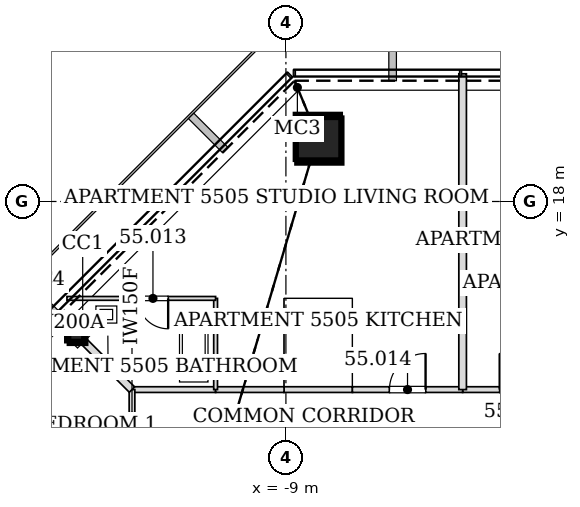
"""IFC4 building model, lengths in metres.
Left out: names, types, materials, properties, quantities, classifications, styles, units other than length and angle.
Written with IfcOpenShell. Run it as: python <this file> out.ifc"""

import sys

from ifc_helpers import new_model, si_unit, direction, frame, frame_2d, origin, origin_2d, place, context, subcontext, project, spatial, rectangle, hollow_rectangle, extrude, element, fill, save


model = new_model("IFC4")
c1 = context("Model", 3, precision=1e-05, world=origin(), true_north=direction((0.0, 1.0)))
c2 = subcontext(c1, "Body", "Model", "MODEL_VIEW")
j1 = project(units=[si_unit("LENGTHUNIT", "METRE"), si_unit("PLANEANGLEUNIT", "RADIAN")], contexts=[c1])
p1 = place(None, origin())
s1 = spatial("IfcSite", under=j1, at=p1, CompositionType="ELEMENT")
p2 = place(p1, origin())
s2 = spatial("IfcBuilding", under=s1, at=p2, CompositionType="ELEMENT")
p3 = place(p2, frame((0.0, 0.0, 234.6)))
s3 = spatial("IfcBuildingStorey", under=s2, at=p3, CompositionType="ELEMENT", Elevation=234.6)
p4 = place(p3, frame((-8.16, 19.7, 0.0), z_axis=(0.01169924247, -0.02827915051, 0.999531598986), x_axis=(0.924045401938, 0.382282742426, 0.0)))
e1 = element("IfcColumn", 1, at=p4, inside=s3, PredefinedType="COLUMN", context=c2, shape_type="SweptSolid", body=[
    extrude(hollow_rectangle(XDim=1.2, YDim=1.2, WallThickness=0.055, at=origin_2d()), origin(), (0.0, 0.0, 1.0), 3.402),
])
p5 = place(p3, frame((-14.551, 14.551, 0.0), z_axis=(0.020026431307, -0.020026431307, 0.999598861593), x_axis=(0.707106781187, 0.707106781187, 0.0)))
e2 = element("IfcColumn", 2, at=p5, inside=s3, PredefinedType="COLUMN", context=c2, shape_type="SweptSolid", body=[
    extrude(hollow_rectangle(XDim=0.45, YDim=0.45, WallThickness=0.02, at=origin_2d()), origin(), (0.0, 0.0, 1.0), 3.401),
])
p6 = place(p3, frame((-1.449, 13.05, 0.0), z_axis=(0.0, 0.0, 1.0), x_axis=(-1.0, 0.0, 0.0)))
e3 = element("IfcWall", 3, at=p6, inside=s3, PredefinedType="PARTITIONING", context=c2, shape_type="SweptSolid", body=[
    extrude(rectangle(XDim=2.902, YDim=0.15, at=frame_2d((1.451, 0.0))), origin(), (0.0, 0.0, 1.0), 2.73),
])
p7 = place(p6, frame((0.976, 0.0, 0.0)))
e4 = element("IfcOpeningElement", 4, at=p7, cuts=e3, PredefinedType="OPENING", context=c2, shape_type="SweptSolid", body=[
    extrude(rectangle(XDim=0.95, YDim=2.1, at=frame_2d((0.475, 1.05))), frame((0.0, 0.085, 0.0), z_axis=(0.0, -1.0, 0.0), x_axis=(1.0, 0.0, 0.0)), (0.0, 0.0, 1.0), 0.17),
])
p8 = place(p3, frame((-10.849, 13.05, 0.0), z_axis=(0.0, 0.0, 1.0), x_axis=(-1.0, 0.0, 0.0)))
e5 = element("IfcWall", 5, at=p8, inside=s3, PredefinedType="PARTITIONING", context=c2, shape_type="SweptSolid", body=[
    extrude(rectangle(XDim=2.201, YDim=0.15, at=frame_2d((1.101, 0.0))), origin(), (0.0, 0.0, 1.0), 2.583),
])
p9 = place(p3, frame((-7.249, 13.05, 0.0), z_axis=(0.0, 0.0, 1.0), x_axis=(-1.0, 0.0, 0.0)))
e6 = element("IfcWall", 6, at=p9, inside=s3, PredefinedType="PARTITIONING", context=c2, shape_type="SweptSolid", body=[
    extrude(rectangle(XDim=1.802, YDim=0.15, at=frame_2d((0.901, 0.0))), origin(), (0.0, 0.0, 1.0), 2.73),
])
p10 = place(p3, frame((-9.049, 13.05, 0.0), z_axis=(0.0, 0.0, 1.0), x_axis=(-1.0, 0.0, 0.0)))
e7 = element("IfcWall", 7, at=p10, inside=s3, PredefinedType="PARTITIONING", context=c2, shape_type="SweptSolid", body=[
    extrude(rectangle(XDim=1.802, YDim=0.15, at=frame_2d((0.901, 0.0))), origin(), (0.0, 0.0, 1.0), 2.344),
])
p11 = place(p3, frame((-4.349, 13.05, 0.0), z_axis=(0.0, 0.0, 1.0), x_axis=(-1.0, 0.0, 0.0)))
e8 = element("IfcWall", 8, at=p11, inside=s3, PredefinedType="PARTITIONING", context=c2, shape_type="SweptSolid", body=[
    extrude(rectangle(XDim=2.902, YDim=0.15, at=frame_2d((1.451, 0.0))), origin(), (0.0, 0.0, 1.0), 2.73),
])
p12 = place(p11, frame((0.976, 0.0, 0.0)))
e9 = element("IfcOpeningElement", 9, at=p12, cuts=e8, PredefinedType="OPENING", context=c2, shape_type="SweptSolid", body=[
    extrude(rectangle(XDim=0.95, YDim=2.1, at=frame_2d((0.475, 1.05))), frame((0.0, 0.085, 0.0), z_axis=(0.0, -1.0, 0.0), x_axis=(1.0, 0.0, 0.0)), (0.0, 0.0, 1.0), 0.17),
])
p13 = place(p3, frame((-13.05, 13.05, 0.0), z_axis=(0.0, 0.0, 1.0), x_axis=(0.0, -1.0, 0.0)))
e10 = element("IfcWall", 10, at=p13, inside=s3, PredefinedType="PARTITIONING", context=c2, shape_type="SweptSolid", body=[
    extrude(rectangle(XDim=1.401, YDim=0.15, at=frame_2d((0.701, 0.0))), origin(), (0.0, 0.0, 1.0), 2.583),
])
p14 = place(p3, frame((-4.35, 21.36, 0.0), z_axis=(0.0, 0.0, 1.0), x_axis=(0.0, -1.0, 0.0)))
e11 = element("IfcWall", 11, at=p14, inside=s3, PredefinedType="PARTITIONING", context=c2, shape_type="SweptSolid", body=[
    extrude(rectangle(XDim=8.31, YDim=0.2, at=frame_2d((4.155, 0.0))), origin(), (0.0, 0.0, 1.0), 2.662),
])
p15 = place(p3, frame((-10.85, 13.05, 0.0), z_axis=(0.0, 0.0, 1.0), x_axis=(0.0, 1.0, 0.0)))
e12 = element("IfcWall", 12, at=p15, inside=s3, PredefinedType="PARTITIONING", context=c2, shape_type="SweptSolid", body=[
    extrude(rectangle(XDim=2.4, YDim=0.1, at=frame_2d((1.2, 0.0))), origin(), (0.0, 0.0, 1.0), 2.786),
])
p16 = place(p3, frame((-10.85, 15.45, 0.0), z_axis=(0.0, 0.0, 1.0), x_axis=(-1.0, 0.0, 0.0)))
e13 = element("IfcWall", 13, at=p16, inside=s3, PredefinedType="PARTITIONING", context=c2, shape_type="SweptSolid", body=[
    extrude(rectangle(XDim=3.912, YDim=0.1, at=frame_2d((1.956, 0.0))), origin(), (0.0, 0.0, 1.0), 2.783),
])
p17 = place(p16, frame((1.249, 0.0, 0.0)))
e14 = element("IfcOpeningElement", 14, at=p17, cuts=e13, PredefinedType="OPENING", context=c2, shape_type="SweptSolid", body=[
    extrude(rectangle(XDim=0.8, YDim=2.1, at=frame_2d((0.4, 1.05))), frame((0.0, 0.06, 0.0), z_axis=(0.0, -1.0, 0.0), x_axis=(1.0, 0.0, 0.0)), (0.0, 0.0, 1.0), 0.12),
])
p18 = place(p3, frame((-14.31, 14.31, 0.0), z_axis=(0.0, 0.0, 1.0), x_axis=(0.707106781187, -0.707106781187, 0.0)))
e15 = element("IfcWall", 15, at=p18, inside=s3, PredefinedType="PARTITIONING", context=c2, shape_type="SweptSolid", body=[
    extrude(rectangle(XDim=1.782, YDim=0.2, at=frame_2d((0.891, 0.0))), origin(), (0.0, 0.0, 1.0), 2.583),
])
p19 = place(p7, frame((0.95, 0.0, 0.0), z_axis=(0.0, 0.0, 1.0), x_axis=(-1.0, 0.0, 0.0)))
e16 = element("IfcDoor", 16, at=p19, inside=s3, OperationType="SINGLE_SWING_LEFT", PredefinedType="DOOR", context=c2, shape_type="SweptSolid", body=[
    extrude(rectangle(XDim=0.95, YDim=2.1, at=frame_2d((0.475, 1.05))), frame((0.0, 0.025, 0.0), z_axis=(0.0, -1.0, 0.0), x_axis=(1.0, 0.0, 0.0)), (0.0, 0.0, 1.0), 0.05),
])
fill(e4, e16)
p20 = place(p17, origin())
e17 = element("IfcDoor", 17, at=p20, inside=s3, OperationType="SINGLE_SWING_LEFT", PredefinedType="DOOR", context=c2, shape_type="SweptSolid", body=[
    extrude(rectangle(XDim=0.8, YDim=2.1, at=frame_2d((0.4, 1.05))), frame((0.0, 0.025, 0.0), z_axis=(0.0, -1.0, 0.0), x_axis=(1.0, 0.0, 0.0)), (0.0, 0.0, 1.0), 0.05),
])
fill(e14, e17)
p21 = place(p12, frame((0.95, 0.0, 0.0), z_axis=(0.0, 0.0, 1.0), x_axis=(-1.0, 0.0, 0.0)))
e18 = element("IfcDoor", 18, at=p21, inside=s3, OperationType="SINGLE_SWING_RIGHT", PredefinedType="DOOR", context=c2, shape_type="SweptSolid", body=[
    extrude(rectangle(XDim=0.95, YDim=2.1, at=frame_2d((0.475, 1.05))), frame((0.0, 0.025, 0.0), z_axis=(0.0, -1.0, 0.0), x_axis=(1.0, 0.0, 0.0)), (0.0, 0.0, 1.0), 0.05),
])
fill(e9, e18)
save(model, sys.argv[1])
